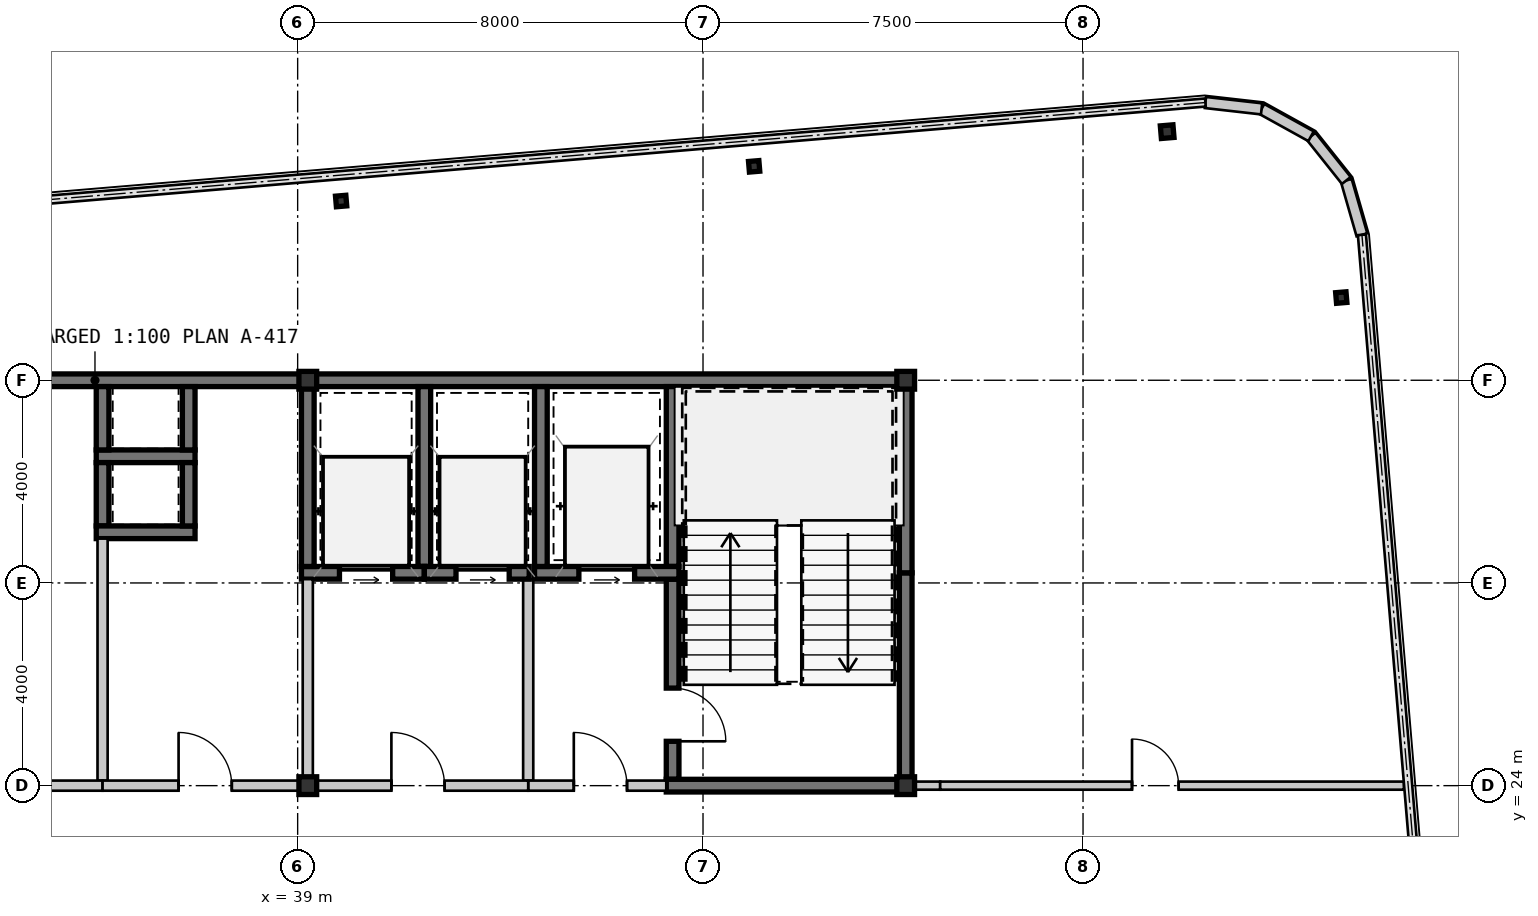
"""IFC4 building model, lengths in metres.
Left out: names, types, materials, properties, quantities, classifications, styles, units other than length and angle.
Written with IfcOpenShell. Run it as: python <this file> out.ifc"""

import sys

from ifc_helpers import new_model, si_unit, direction, frame, frame_2d, origin, origin_2d, place, context, subcontext, project, spatial, rectangle, hollow_rectangle, i_section, extrude, source, transform, mapped, element, fill, save


model = new_model("IFC4")
c1 = context("Model", 3, precision=1e-05, world=origin(), true_north=direction((0.0, 1.0)))
c2 = subcontext(c1, "Body", "Model", "MODEL_VIEW")
j1 = project(units=[si_unit("LENGTHUNIT", "METRE"), si_unit("PLANEANGLEUNIT", "RADIAN")], contexts=[c1])
p1 = place(None, origin())
s1 = spatial("IfcSite", under=j1, at=p1, CompositionType="ELEMENT")
p2 = place(p1, origin())
s2 = spatial("IfcBuilding", under=s1, at=p2, CompositionType="ELEMENT")
p3 = place(p2, frame((0.0, 0.0, 204.05)))
s3 = spatial("IfcBuildingStorey", under=s2, at=p3, CompositionType="ELEMENT", Elevation=204.05)
m1 = source(origin(), c2, "Body", "SweptSolid", [
    extrude(hollow_rectangle(XDim=0.35, YDim=0.35, WallThickness=0.016, at=origin_2d()), origin(), (0.0, 0.0, 1.0), 3.15),
])
for number, where, z_axis, x_axis in (
    (1, (39.2, 24.0, 0.0), (0.0, 0.0, 1.0), (1.0, 0.0, 0.0)),
    (2, (51.0, 24.0, 0.0), (0.0, 0.0, 1.0), (1.0, 0.0, 0.0)),
    (3, (39.2, 32.0, 0.0), (0.0, 0.0, 1.0), (1.0, 0.0, 0.0)),
    (4, (51.0, 32.0, 0.0), (0.0, 0.0, 1.0), (1.0, 0.0, 0.0)),
):
    element("IfcColumn", number, at=place(p3, frame(where, z_axis=z_axis, x_axis=x_axis)), inside=s3, PredefinedType="COLUMN", context=c2, shape_type="MappedRepresentation", body=[
        mapped(m1, transform((0.0, 0.0, 0.0), scale=1.0)),
    ])
m2 = source(origin(), c2, "Body", "SweptSolid", [
    extrude(i_section(OverallWidth=0.205, OverallDepth=0.21, WebThickness=0.009, FlangeThickness=0.014, at=origin_2d()), origin(), (0.0, 0.0, 1.0), 3.15),
])
for number, where, z_axis, x_axis in (
    (5, (39.858, 35.537, 0.0), (0.0, 0.0, 1.0), (0.996, 0.084, 0.0)),
    (6, (48.009, 36.221, 0.0), (0.0, 0.0, 1.0), (0.996, 0.084, 0.0)),
):
    element("IfcColumn", number, at=place(p3, frame(where, z_axis=z_axis, x_axis=x_axis)), inside=s3, PredefinedType="COLUMN", context=c2, shape_type="MappedRepresentation", body=[
        mapped(m2, transform((0.0, 0.0, 0.0), scale=1.0)),
    ])
m3 = source(origin(), c2, "Body", "SweptSolid", [
    extrude(hollow_rectangle(XDim=0.25, YDim=0.25, WallThickness=0.01, at=origin_2d()), origin(), (0.0, 0.0, 1.0), 3.15),
])
p4 = place(p3, frame((56.16, 36.906, 0.0), z_axis=(0.0, 0.0, 1.0), x_axis=(0.99649285925, 0.083677843332, 0.0)))
e7 = element("IfcColumn", 7, at=p4, inside=s3, PredefinedType="COLUMN", context=c2, shape_type="MappedRepresentation", body=[
    mapped(m3, transform((0.0, 0.0, 0.0), scale=1.0)),
])
p5 = place(p3, frame((59.596, 33.632, 0.0), z_axis=(0.0, 0.0, 1.0), x_axis=(0.99649285925, 0.083677843332, 0.0)))
e8 = element("IfcColumn", 8, at=p5, inside=s3, PredefinedType="COLUMN", context=c2, shape_type="MappedRepresentation", body=[
    mapped(m2, transform((0.0, 0.0, 0.0), scale=1.0)),
])
m4 = source(origin(), c2, "Body", "SweptSolid", [
    extrude(rectangle(XDim=1.116, YDim=0.22, at=frame_2d((0.558, 0.0))), origin(), (0.0, 0.0, 1.0), 2.87),
])
for number, where, z_axis, x_axis in (
    (9, (60.004, 34.87, 0.0), (0.0, 0.0, 1.0), (-0.277, 0.961, 0.0)),
    (10, (59.696, 35.943, 0.0), (0.0, 0.0, 1.0), (-0.623, 0.782, 0.0)),
    (11, (59.0, 36.816, 0.0), (0.0, 0.0, 1.0), (-0.875, 0.484, 0.0)),
    (12, (58.024, 37.356, 0.0), (0.0, 0.0, 1.0), (-0.994, 0.112, 0.0)),
):
    element("IfcWall", number, at=place(p3, frame(where, z_axis=z_axis, x_axis=x_axis)), inside=s3, PredefinedType="SOLIDWALL", context=c2, shape_type="MappedRepresentation", body=[
        mapped(m4, transform((0.0, 0.0, 0.0), scale=1.0)),
    ])
m5 = source(origin(), c2, "Body", "SweptSolid", [
    extrude(rectangle(XDim=11.2, YDim=0.25, at=frame_2d((5.6, 0.0))), origin(), (0.0, 0.0, 1.0), 2.87),
])
p6 = place(p3, frame((28.0, 32.0, 0.0), z_axis=(0.0, 0.0, 1.0), x_axis=(1.0, 0.0, 0.0)))
e13 = element("IfcWall", 13, at=p6, inside=s3, PredefinedType="SHEAR", context=c2, shape_type="MappedRepresentation", body=[
    mapped(m5, transform((0.0, 0.0, 0.0), scale=1.0)),
])
m6 = source(origin(), c2, "Body", "SweptSolid", [
    extrude(rectangle(XDim=11.925, YDim=0.25, at=frame_2d((5.962, 0.0))), origin(), (0.0, 0.0, 1.0), 2.87),
])
p7 = place(p3, frame((39.2, 32.0, 0.0), z_axis=(0.0, 0.0, 1.0), x_axis=(1.0, 0.0, 0.0)))
e14 = element("IfcWall", 14, at=p7, inside=s3, PredefinedType="SHEAR", context=c2, shape_type="MappedRepresentation", body=[
    mapped(m6, transform((0.0, 0.0, 0.0), scale=1.0)),
])
m7 = source(origin(), c2, "Body", "SweptSolid", [
    extrude(rectangle(XDim=4.075, YDim=0.25, at=frame_2d((2.038, 0.0))), origin(), (0.0, 0.0, 1.0), 2.87),
])
p8 = place(p3, frame((51.0, 24.125, 0.0), z_axis=(0.0, 0.0, 1.0), x_axis=(0.0, 1.0, 0.0)))
e15 = element("IfcWall", 15, at=p8, inside=s3, PredefinedType="SHEAR", context=c2, shape_type="MappedRepresentation", body=[
    mapped(m7, transform((0.0, 0.0, 0.0), scale=1.0)),
])
m8 = source(origin(), c2, "Body", "SweptSolid", [
    extrude(rectangle(XDim=3.675, YDim=0.25, at=frame_2d((1.837, 0.0))), origin(), (0.0, 0.0, 1.0), 2.87),
])
p9 = place(p3, frame((51.0, 28.2, 0.0), z_axis=(0.0, 0.0, 1.0), x_axis=(0.0, 1.0, 0.0)))
e16 = element("IfcWall", 16, at=p9, inside=s3, PredefinedType="SHEAR", context=c2, shape_type="MappedRepresentation", body=[
    mapped(m8, transform((0.0, 0.0, 0.0), scale=1.0)),
])
m9 = source(origin(), c2, "Body", "SweptSolid", [
    extrude(rectangle(XDim=3.55, YDim=0.25, at=frame_2d((1.775, 0.0))), origin(), (0.0, 0.0, 1.0), 2.87),
])
p10 = place(p3, frame((46.4, 31.875, 0.0), z_axis=(0.0, 0.0, 1.0), x_axis=(0.0, -1.0, 0.0)))
e17 = element("IfcWall", 17, at=p10, inside=s3, PredefinedType="SHEAR", context=c2, shape_type="MappedRepresentation", body=[
    mapped(m9, transform((0.0, 0.0, 0.0), scale=1.0)),
])
m10 = source(origin(), c2, "Body", "SweptSolid", [
    extrude(rectangle(XDim=3.95, YDim=0.25, at=frame_2d((1.975, 0.0))), origin(), (0.0, 0.0, 1.0), 2.87),
])
p11 = place(p3, frame((46.4, 28.075, 0.0), z_axis=(0.0, 0.0, 1.0), x_axis=(0.0, -1.0, 0.0)))
e18 = element("IfcWall", 18, at=p11, inside=s3, PredefinedType="SHEAR", context=c2, shape_type="MappedRepresentation", body=[
    mapped(m10, transform((0.0, 0.0, 0.0), scale=1.0)),
])
m11 = source(origin(), c2, "Body", "SweptSolid", [
    extrude(rectangle(XDim=1.05, YDim=2.1, at=frame_2d((0.525, 1.05))), frame((0.0, 0.135, 0.0), z_axis=(0.0, -1.0, 0.0), x_axis=(1.0, 0.0, 0.0)), (0.0, 0.0, 1.0), 0.27),
])
p12 = place(p11, frame((2.15, 0.0, 0.0)))
e19 = element("IfcOpeningElement", 19, at=p12, cuts=e18, PredefinedType="OPENING", context=c2, shape_type="MappedRepresentation", body=[
    mapped(m11, transform((0.0, 0.0, 0.0), scale=1.0)),
])
m12 = source(origin(), c2, "Body", "SweptSolid", [
    extrude(rectangle(XDim=4.85, YDim=0.25, at=frame_2d((2.425, 0.0))), origin(), (0.0, 0.0, 1.0), 2.87),
])
p13 = place(p3, frame((46.275, 24.0, 0.0), z_axis=(0.0, 0.0, 1.0), x_axis=(1.0, 0.0, 0.0)))
e20 = element("IfcWall", 20, at=p13, inside=s3, PredefinedType="SHEAR", context=c2, shape_type="MappedRepresentation", body=[
    mapped(m12, transform((0.0, 0.0, 0.0), scale=1.0)),
])
m13 = source(origin(), c2, "Body", "SweptSolid", [
    extrude(rectangle(XDim=2.85, YDim=0.25, at=frame_2d((1.425, 0.0))), origin(), (0.0, 0.0, 1.0), 2.87),
])
p14 = place(p3, frame((43.675, 28.2, 0.0), z_axis=(0.0, 0.0, 1.0), x_axis=(1.0, 0.0, 0.0)))
e21 = element("IfcWall", 21, at=p14, inside=s3, PredefinedType="SHEAR", context=c2, shape_type="MappedRepresentation", body=[
    mapped(m13, transform((0.0, 0.0, 0.0), scale=1.0)),
])
m14 = source(origin(), c2, "Body", "SweptSolid", [
    extrude(rectangle(XDim=1.1, YDim=2.15, at=frame_2d((0.55, 1.075))), frame((0.0, 0.135, 0.0), z_axis=(0.0, -1.0, 0.0), x_axis=(1.0, 0.0, 0.0)), (0.0, 0.0, 1.0), 0.27),
])
p15 = place(p14, frame((0.875, 0.0, 0.0)))
e22 = element("IfcOpeningElement", 22, at=p15, cuts=e21, PredefinedType="OPENING", context=c2, shape_type="MappedRepresentation", body=[
    mapped(m14, transform((0.0, 0.0, 0.0), scale=1.0)),
])
p16 = place(p3, frame((43.8, 31.875, 0.0), z_axis=(0.0, 0.0, 1.0), x_axis=(0.0, -1.0, 0.0)))
e23 = element("IfcWall", 23, at=p16, inside=s3, PredefinedType="SHEAR", context=c2, shape_type="MappedRepresentation", body=[
    mapped(m9, transform((0.0, 0.0, 0.0), scale=1.0)),
])
m15 = source(origin(), c2, "Body", "SweptSolid", [
    extrude(rectangle(XDim=3.975, YDim=0.2, at=frame_2d((1.987, 0.0))), origin(), (0.0, 0.0, 1.0), 2.87),
])
p17 = place(p3, frame((43.55, 28.075, 0.0), z_axis=(0.0, 0.0, 1.0), x_axis=(0.0, -1.0, 0.0)))
e24 = element("IfcWall", 24, at=p17, inside=s3, PredefinedType="SOLIDWALL", context=c2, shape_type="MappedRepresentation", body=[
    mapped(m15, transform((0.0, 0.0, 0.0), scale=1.0)),
])
m16 = source(origin(), c2, "Body", "SweptSolid", [
    extrude(rectangle(XDim=2.725, YDim=0.2, at=frame_2d((1.362, 0.0))), origin(), (0.0, 0.0, 1.0), 2.337),
])
p18 = place(p3, frame((43.55, 24.0, 0.0), z_axis=(0.0, 0.0, 1.0), x_axis=(1.0, 0.0, 0.0)))
e25 = element("IfcWall", 25, at=p18, inside=s3, PredefinedType="SOLIDWALL", context=c2, shape_type="MappedRepresentation", body=[
    mapped(m16, transform((0.0, 0.0, 0.0), scale=1.0)),
])
m17 = source(origin(), c2, "Body", "SweptSolid", [
    extrude(rectangle(XDim=1.05, YDim=2.1, at=frame_2d((0.525, 1.05))), frame((0.0, 0.11, 0.0), z_axis=(0.0, -1.0, 0.0), x_axis=(1.0, 0.0, 0.0)), (0.0, 0.0, 1.0), 0.22),
])
p19 = place(p18, frame((0.9, 0.0, 0.0)))
e26 = element("IfcOpeningElement", 26, at=p19, cuts=e25, PredefinedType="OPENING", context=c2, shape_type="MappedRepresentation", body=[
    mapped(m17, transform((0.0, 0.0, 0.0), scale=1.0)),
])
m18 = source(origin(), c2, "Body", "SweptSolid", [
    extrude(rectangle(XDim=1.95, YDim=0.25, at=frame_2d((0.975, 0.0))), origin(), (0.0, 0.0, 1.0), 2.87),
])
p20 = place(p3, frame((35.025, 30.5, 0.0), z_axis=(0.0, 0.0, 1.0), x_axis=(1.0, 0.0, 0.0)))
e27 = element("IfcWall", 27, at=p20, inside=s3, PredefinedType="SHEAR", context=c2, shape_type="MappedRepresentation", body=[
    mapped(m18, transform((0.0, 0.0, 0.0), scale=1.0)),
])
m19 = source(origin(), c2, "Body", "SweptSolid", [
    extrude(rectangle(XDim=1.25, YDim=0.25, at=frame_2d((0.625, 0.0))), origin(), (0.0, 0.0, 1.0), 2.87),
])
for number, where, z_axis, x_axis in (
    (28, (35.15, 31.875, 0.0), (0.0, 0.0, 1.0), (0.0, -1.0, 0.0)),
    (29, (36.85, 30.625, 0.0), (0.0, 0.0, 1.0), (0.0, 1.0, 0.0)),
    (30, (35.15, 30.375, 0.0), (0.0, 0.0, 1.0), (0.0, -1.0, 0.0)),
):
    element("IfcWall", number, at=place(p3, frame(where, z_axis=z_axis, x_axis=x_axis)), inside=s3, PredefinedType="SHEAR", context=c2, shape_type="MappedRepresentation", body=[
        mapped(m19, transform((0.0, 0.0, 0.0), scale=1.0)),
    ])
p21 = place(p3, frame((35.025, 29.0, 0.0), z_axis=(0.0, 0.0, 1.0), x_axis=(1.0, 0.0, 0.0)))
e31 = element("IfcWall", 31, at=p21, inside=s3, PredefinedType="SHEAR", context=c2, shape_type="MappedRepresentation", body=[
    mapped(m18, transform((0.0, 0.0, 0.0), scale=1.0)),
])
p22 = place(p3, frame((36.85, 29.125, 0.0), z_axis=(0.0, 0.0, 1.0), x_axis=(0.0, 1.0, 0.0)))
e32 = element("IfcWall", 32, at=p22, inside=s3, PredefinedType="SHEAR", context=c2, shape_type="MappedRepresentation", body=[
    mapped(m19, transform((0.0, 0.0, 0.0), scale=1.0)),
])
p23 = place(p3, frame((41.5, 28.325, 0.0), z_axis=(0.0, 0.0, 1.0), x_axis=(0.0, 1.0, 0.0)))
e33 = element("IfcWall", 33, at=p23, inside=s3, PredefinedType="SHEAR", context=c2, shape_type="MappedRepresentation", body=[
    mapped(m9, transform((0.0, 0.0, 0.0), scale=1.0)),
])
m20 = source(origin(), c2, "Body", "SweptSolid", [
    extrude(rectangle(XDim=2.425, YDim=0.25, at=frame_2d((1.212, 0.0))), origin(), (0.0, 0.0, 1.0), 2.87),
])
p24 = place(p3, frame((39.075, 28.2, 0.0), z_axis=(0.0, 0.0, 1.0), x_axis=(1.0, 0.0, 0.0)))
e34 = element("IfcWall", 34, at=p24, inside=s3, PredefinedType="SHEAR", context=c2, shape_type="MappedRepresentation", body=[
    mapped(m20, transform((0.0, 0.0, 0.0), scale=1.0)),
])
m21 = source(origin(), c2, "Body", "SweptSolid", [
    extrude(rectangle(XDim=1.05, YDim=2.15, at=frame_2d((0.525, 1.075))), frame((0.0, 0.135, 0.0), z_axis=(0.0, -1.0, 0.0), x_axis=(1.0, 0.0, 0.0)), (0.0, 0.0, 1.0), 0.27),
])
p25 = place(p24, frame((0.75, 0.0, 0.0)))
e35 = element("IfcOpeningElement", 35, at=p25, cuts=e34, PredefinedType="OPENING", context=c2, shape_type="MappedRepresentation", body=[
    mapped(m21, transform((0.0, 0.0, 0.0), scale=1.0)),
])
p26 = place(p3, frame((39.2, 31.875, 0.0), z_axis=(0.0, 0.0, 1.0), x_axis=(0.0, -1.0, 0.0)))
e36 = element("IfcWall", 36, at=p26, inside=s3, PredefinedType="SHEAR", context=c2, shape_type="MappedRepresentation", body=[
    mapped(m9, transform((0.0, 0.0, 0.0), scale=1.0)),
])
m22 = source(origin(), c2, "Body", "SweptSolid", [
    extrude(rectangle(XDim=2.07, YDim=0.25, at=frame_2d((1.035, 0.0))), origin(), (0.0, 0.0, 1.0), 2.87),
])
p27 = place(p3, frame((41.5, 28.2, 0.0), z_axis=(0.0, 0.0, 1.0), x_axis=(1.0, 0.0, 0.0)))
e37 = element("IfcWall", 37, at=p27, inside=s3, PredefinedType="SHEAR", context=c2, shape_type="MappedRepresentation", body=[
    mapped(m22, transform((0.0, 0.0, 0.0), scale=1.0)),
])
p28 = place(p27, frame((0.625, 0.0, 0.0)))
e38 = element("IfcOpeningElement", 38, at=p28, cuts=e37, PredefinedType="OPENING", context=c2, shape_type="MappedRepresentation", body=[
    mapped(m21, transform((0.0, 0.0, 0.0), scale=1.0)),
])
m23 = source(origin(), c2, "Body", "SweptSolid", [
    extrude(rectangle(XDim=3.975, YDim=0.2, at=frame_2d((1.987, 0.0))), origin(), (0.0, 0.0, 1.0), 2.41),
])
p29 = place(p3, frame((39.2, 24.1, 0.0), z_axis=(0.0, 0.0, 1.0), x_axis=(0.0, 1.0, 0.0)))
e39 = element("IfcWall", 39, at=p29, inside=s3, PredefinedType="SOLIDWALL", context=c2, shape_type="MappedRepresentation", body=[
    mapped(m23, transform((0.0, 0.0, 0.0), scale=1.0)),
])
m24 = source(origin(), c2, "Body", "SweptSolid", [
    extrude(rectangle(XDim=4.35, YDim=0.2, at=frame_2d((2.175, 0.0))), origin(), (0.0, 0.0, 1.0), 2.337),
])
p30 = place(p3, frame((43.55, 24.0, 0.0), z_axis=(0.0, 0.0, 1.0), x_axis=(-1.0, 0.0, 0.0)))
e40 = element("IfcWall", 40, at=p30, inside=s3, PredefinedType="SOLIDWALL", context=c2, shape_type="MappedRepresentation", body=[
    mapped(m24, transform((0.0, 0.0, 0.0), scale=1.0)),
])
p31 = place(p30, frame((1.65, 0.0, 0.0)))
e41 = element("IfcOpeningElement", 41, at=p31, cuts=e40, PredefinedType="OPENING", context=c2, shape_type="MappedRepresentation", body=[
    mapped(m17, transform((0.0, 0.0, 0.0), scale=1.0)),
])
m25 = source(origin(), c2, "Body", "SweptSolid", [
    extrude(rectangle(XDim=4.775, YDim=0.2, at=frame_2d((2.387, 0.0))), origin(), (0.0, 0.0, 1.0), 2.87),
])
p32 = place(p3, frame((35.15, 28.875, 0.0), z_axis=(0.0, 0.0, 1.0), x_axis=(0.0, -1.0, 0.0)))
e42 = element("IfcWall", 42, at=p32, inside=s3, PredefinedType="SOLIDWALL", context=c2, shape_type="MappedRepresentation", body=[
    mapped(m25, transform((0.0, 0.0, 0.0), scale=1.0)),
])
m26 = source(origin(), c2, "Body", "SweptSolid", [
    extrude(rectangle(XDim=8.7, YDim=0.2, at=frame_2d((4.35, 0.0))), origin(), (0.0, 0.0, 1.0), 2.41),
])
p33 = place(p3, frame((35.15, 24.0, 0.0), z_axis=(0.0, 0.0, 1.0), x_axis=(-1.0, 0.0, 0.0)))
e43 = element("IfcWall", 43, at=p33, inside=s3, PredefinedType="SOLIDWALL", context=c2, shape_type="MappedRepresentation", body=[
    mapped(m26, transform((0.0, 0.0, 0.0), scale=1.0)),
])
p34 = place(p33, frame((3.825, 0.0, 0.0)))
e44 = element("IfcOpeningElement", 44, at=p34, cuts=e43, PredefinedType="OPENING", context=c2, shape_type="MappedRepresentation", body=[
    mapped(m17, transform((0.0, 0.0, 0.0), scale=1.0)),
])
m27 = source(origin(), c2, "Body", "SweptSolid", [
    extrude(rectangle(XDim=4.05, YDim=0.2, at=frame_2d((2.025, 0.0))), origin(), (0.0, 0.0, 1.0), 2.41),
])
p35 = place(p3, frame((39.2, 24.0, 0.0), z_axis=(0.0, 0.0, 1.0), x_axis=(-1.0, 0.0, 0.0)))
e45 = element("IfcWall", 45, at=p35, inside=s3, PredefinedType="SOLIDWALL", context=c2, shape_type="MappedRepresentation", body=[
    mapped(m27, transform((0.0, 0.0, 0.0), scale=1.0)),
])
p36 = place(p35, frame((1.5, 0.0, 0.0)))
e46 = element("IfcOpeningElement", 46, at=p36, cuts=e45, PredefinedType="OPENING", context=c2, shape_type="MappedRepresentation", body=[
    mapped(m17, transform((0.0, 0.0, 0.0), scale=1.0)),
])
m28 = source(origin(), c2, "Body", "SweptSolid", [
    extrude(rectangle(XDim=0.556, YDim=0.16, at=frame_2d((0.278, 0.0))), origin(), (0.0, 0.0, 1.0), 2.41),
])
p37 = place(p3, frame((51.125, 24.0, 0.0), z_axis=(0.0, 0.0, 1.0), x_axis=(1.0, 0.0, 0.0)))
e47 = element("IfcWall", 47, at=p37, inside=s3, PredefinedType="PARTITIONING", context=c2, shape_type="MappedRepresentation", body=[
    mapped(m28, transform((0.0, 0.0, 0.0), scale=1.0)),
])
m29 = source(origin(), c2, "Body", "SweptSolid", [
    extrude(rectangle(XDim=9.153, YDim=0.16, at=frame_2d((4.576, 0.0))), origin(), (0.0, 0.0, 1.0), 2.87),
])
p38 = place(p3, frame((51.681, 24.0, 0.0), z_axis=(0.0, 0.0, 1.0), x_axis=(1.0, 0.0, 0.0)))
e48 = element("IfcWall", 48, at=p38, inside=s3, PredefinedType="PARTITIONING", context=c2, shape_type="MappedRepresentation", body=[
    mapped(m29, transform((0.0, 0.0, 0.0), scale=1.0)),
])
m30 = source(origin(), c2, "Body", "SweptSolid", [
    extrude(rectangle(XDim=0.92, YDim=2.1, at=frame_2d((0.46, 1.05))), frame((0.0, 0.09, 0.0), z_axis=(0.0, -1.0, 0.0), x_axis=(1.0, 0.0, 0.0)), (0.0, 0.0, 1.0), 0.18),
])
p39 = place(p38, frame((3.786, 0.0, 0.0)))
e49 = element("IfcOpeningElement", 49, at=p39, cuts=e48, PredefinedType="OPENING", context=c2, shape_type="MappedRepresentation", body=[
    mapped(m30, transform((0.0, 0.0, 0.0), scale=1.0)),
])
m31 = source(origin(), c2, "Body", "SweptSolid", [
    extrude(rectangle(XDim=1.05, YDim=2.1, at=frame_2d((0.525, 1.05))), frame((0.0, 0.025, 0.0), z_axis=(0.0, -1.0, 0.0), x_axis=(1.0, 0.0, 0.0)), (0.0, 0.0, 1.0), 0.05),
])
p40 = place(p12, origin())
e50 = element("IfcDoor", 50, at=p40, inside=s3, OperationType="SINGLE_SWING_RIGHT", PredefinedType="DOOR", context=c2, shape_type="MappedRepresentation", body=[
    mapped(m31, transform((0.0, 0.0, 0.0), scale=1.0)),
])
fill(e19, e50)
m32 = source(origin(), c2, "Body", "SweptSolid", [
    extrude(rectangle(XDim=1.1, YDim=2.15, at=frame_2d((0.55, 1.075))), frame((0.0, 0.025, 0.0), z_axis=(0.0, -1.0, 0.0), x_axis=(1.0, 0.0, 0.0)), (0.0, 0.0, 1.0), 0.05),
])
p41 = place(p15, origin())
e51 = element("IfcDoor", 51, at=p41, inside=s3, OperationType="SLIDING_TO_LEFT", PredefinedType="DOOR", context=c2, shape_type="MappedRepresentation", body=[
    mapped(m32, transform((0.0, 0.0, 0.0), scale=1.0)),
])
fill(e22, e51)
p42 = place(p19, origin())
e52 = element("IfcDoor", 52, at=p42, inside=s3, OperationType="SINGLE_SWING_LEFT", PredefinedType="DOOR", context=c2, shape_type="MappedRepresentation", body=[
    mapped(m31, transform((0.0, 0.0, 0.0), scale=1.0)),
])
fill(e26, e52)
m33 = source(origin(), c2, "Body", "SweptSolid", [
    extrude(rectangle(XDim=1.05, YDim=2.15, at=frame_2d((0.525, 1.075))), frame((0.0, 0.025, 0.0), z_axis=(0.0, -1.0, 0.0), x_axis=(1.0, 0.0, 0.0)), (0.0, 0.0, 1.0), 0.05),
])
p43 = place(p25, origin())
e53 = element("IfcDoor", 53, at=p43, inside=s3, OperationType="SLIDING_TO_LEFT", PredefinedType="DOOR", context=c2, shape_type="MappedRepresentation", body=[
    mapped(m33, transform((0.0, 0.0, 0.0), scale=1.0)),
])
fill(e35, e53)
p44 = place(p28, origin())
e54 = element("IfcDoor", 54, at=p44, inside=s3, OperationType="SLIDING_TO_LEFT", PredefinedType="DOOR", context=c2, shape_type="MappedRepresentation", body=[
    mapped(m33, transform((0.0, 0.0, 0.0), scale=1.0)),
])
fill(e38, e54)
p45 = place(p31, frame((1.05, 0.0, 0.0), z_axis=(0.0, 0.0, 1.0), x_axis=(-1.0, 0.0, 0.0)))
e55 = element("IfcDoor", 55, at=p45, inside=s3, OperationType="SINGLE_SWING_LEFT", PredefinedType="DOOR", context=c2, shape_type="MappedRepresentation", body=[
    mapped(m31, transform((0.0, 0.0, 0.0), scale=1.0)),
])
fill(e41, e55)
p46 = place(p36, frame((1.05, 0.0, 0.0), z_axis=(0.0, 0.0, 1.0), x_axis=(-1.0, 0.0, 0.0)))
e56 = element("IfcDoor", 56, at=p46, inside=s3, OperationType="SINGLE_SWING_LEFT", PredefinedType="DOOR", context=c2, shape_type="MappedRepresentation", body=[
    mapped(m31, transform((0.0, 0.0, 0.0), scale=1.0)),
])
fill(e46, e56)
m34 = source(origin(), c2, "Body", "SweptSolid", [
    extrude(rectangle(XDim=0.92, YDim=2.1, at=frame_2d((0.46, 1.05))), frame((0.0, 0.025, 0.0), z_axis=(0.0, -1.0, 0.0), x_axis=(1.0, 0.0, 0.0)), (0.0, 0.0, 1.0), 0.05),
])
p47 = place(p39, origin())
e57 = element("IfcDoor", 57, at=p47, inside=s3, OperationType="SINGLE_SWING_LEFT", PredefinedType="DOOR", context=c2, shape_type="MappedRepresentation", body=[
    mapped(m34, transform((0.0, 0.0, 0.0), scale=1.0)),
])
fill(e49, e57)
save(model, sys.argv[1])
